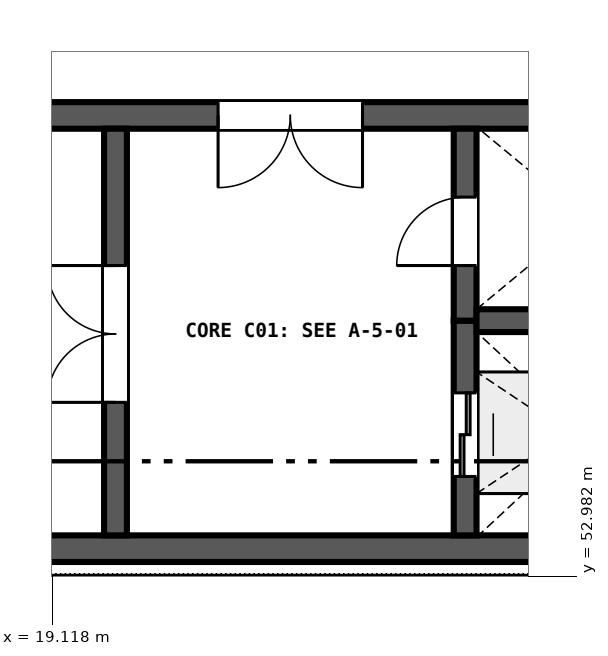
"""IFC4 building model, lengths in metres.
Left out: names, types, materials, properties, quantities, classifications, styles, units other than length and angle.
Written with IfcOpenShell. Run it as: python <this file> out.ifc"""

import sys

from ifc_helpers import new_model, si_unit, direction, frame, frame_2d, origin, place, context, subcontext, project, spatial, rectangle, extrude, element, fill, save


model = new_model("IFC4")
c1 = context("Model", 3, precision=1e-05, world=origin(), true_north=direction((0.0, 1.0)))
c2 = subcontext(c1, "Body", "Model", "MODEL_VIEW")
j1 = project(units=[si_unit("LENGTHUNIT", "METRE"), si_unit("PLANEANGLEUNIT", "RADIAN")], contexts=[c1])
p1 = place(None, origin())
s1 = spatial("IfcSite", under=j1, at=p1, CompositionType="ELEMENT")
p2 = place(p1, origin())
s2 = spatial("IfcBuilding", under=s1, at=p2, CompositionType="ELEMENT")
p3 = place(p2, frame((0.0, 0.0, 9.6)))
s3 = spatial("IfcBuildingStorey", under=s2, at=p3, CompositionType="ELEMENT", Elevation=9.6)
p4 = place(p3, frame((9.9, 53.35, 0.0), z_axis=(0.0, 0.0, 1.0), x_axis=(1.0, 0.0, 0.0)))
e1 = element("IfcWall", 1, at=p4, inside=s3, PredefinedType="SHEAR", context=c2, shape_type="SweptSolid", body=[
    extrude(rectangle(XDim=18.0, YDim=0.35, at=frame_2d((9.0, 0.0))), origin(), (0.0, 0.0, 1.0), 4.5),
])
p5 = place(p3, frame((27.9, 59.05, 0.0), z_axis=(0.0, 0.0, 1.0), x_axis=(-1.0, 0.0, 0.0)))
e2 = element("IfcWall", 2, at=p5, inside=s3, PredefinedType="SHEAR", context=c2, shape_type="SweptSolid", body=[
    extrude(rectangle(XDim=18.0, YDim=0.35, at=frame_2d((9.0, 0.0))), origin(), (0.0, 0.0, 1.0), 4.5),
])
p6 = place(p5, frame((4.7, 0.0, 0.0)))
e3 = element("IfcOpeningElement", 3, at=p6, cuts=e2, PredefinedType="OPENING", context=c2, shape_type="SweptSolid", body=[
    extrude(rectangle(XDim=1.9, YDim=2.25, at=frame_2d((0.95, 1.125))), frame((0.0, 0.185, 0.0), z_axis=(0.0, -1.0, 0.0), x_axis=(1.0, 0.0, 0.0)), (0.0, 0.0, 1.0), 0.37),
])
p7 = place(p3, frame((19.95, 53.525, 0.0), z_axis=(0.0, 0.0, 1.0), x_axis=(0.0, 1.0, 0.0)))
e4 = element("IfcWall", 4, at=p7, inside=s3, PredefinedType="SHEAR", context=c2, shape_type="SweptSolid", body=[
    extrude(rectangle(XDim=5.35, YDim=0.3, at=frame_2d((2.675, 0.0))), origin(), (0.0, 0.0, 1.0), 4.5),
])
p8 = place(p7, frame((1.75, 0.0, 0.0)))
e5 = element("IfcOpeningElement", 5, at=p8, cuts=e4, PredefinedType="OPENING", context=c2, shape_type="SweptSolid", body=[
    extrude(rectangle(XDim=1.8, YDim=2.25, at=frame_2d((0.9, 1.125))), frame((0.0, 0.16, 0.0), z_axis=(0.0, -1.0, 0.0), x_axis=(1.0, 0.0, 0.0)), (0.0, 0.0, 1.0), 0.32),
])
p9 = place(p3, frame((24.55, 53.525, 0.0), z_axis=(0.0, 0.0, 1.0), x_axis=(0.0, 1.0, 0.0)))
e6 = element("IfcWall", 6, at=p9, inside=s3, PredefinedType="SHEAR", context=c2, shape_type="SweptSolid", body=[
    extrude(rectangle(XDim=2.825, YDim=0.3, at=frame_2d((1.413, 0.0))), origin(), (0.0, 0.0, 1.0), 4.5),
])
p10 = place(p9, frame((0.775, 0.0, 0.0)))
e7 = element("IfcOpeningElement", 7, at=p10, cuts=e6, PredefinedType="OPENING", context=c2, shape_type="SweptSolid", body=[
    extrude(rectangle(XDim=1.1, YDim=2.1, at=frame_2d((0.55, 1.05))), frame((0.0, 0.16, 0.0), z_axis=(0.0, -1.0, 0.0), x_axis=(1.0, 0.0, 0.0)), (0.0, 0.0, 1.0), 0.32),
])
p11 = place(p3, frame((24.55, 56.35, 0.0), z_axis=(0.0, 0.0, 1.0), x_axis=(0.0, 1.0, 0.0)))
e8 = element("IfcWall", 8, at=p11, inside=s3, PredefinedType="SHEAR", context=c2, shape_type="SweptSolid", body=[
    extrude(rectangle(XDim=2.525, YDim=0.3, at=frame_2d((1.262, 0.0))), origin(), (0.0, 0.0, 1.0), 4.5),
])
p12 = place(p11, frame((0.725, 0.0, 0.0)))
e9 = element("IfcOpeningElement", 9, at=p12, cuts=e8, PredefinedType="OPENING", context=c2, shape_type="SweptSolid", body=[
    extrude(rectangle(XDim=0.9, YDim=2.1, at=frame_2d((0.45, 1.05))), frame((0.0, 0.16, 0.0), z_axis=(0.0, -1.0, 0.0), x_axis=(1.0, 0.0, 0.0)), (0.0, 0.0, 1.0), 0.32),
])
p13 = place(p3, frame((24.7, 56.35, 0.0), z_axis=(0.0, 0.0, 1.0), x_axis=(1.0, 0.0, 0.0)))
e10 = element("IfcWall", 10, at=p13, inside=s3, PredefinedType="SHEAR", context=c2, shape_type="SweptSolid", body=[
    extrude(rectangle(XDim=2.875, YDim=0.3, at=frame_2d((1.438, 0.0))), origin(), (0.0, 0.0, 1.0), 4.5),
])
p14 = place(p8, origin())
e11 = element("IfcDoor", 11, at=p14, inside=s3, OperationType="DOUBLE_DOOR_SINGLE_SWING", PredefinedType="DOOR", context=c2, shape_type="SweptSolid", body=[
    extrude(rectangle(XDim=1.8, YDim=2.25, at=frame_2d((0.9, 1.125))), frame((0.0, 0.025, 0.0), z_axis=(0.0, -1.0, 0.0), x_axis=(1.0, 0.0, 0.0)), (0.0, 0.0, 1.0), 0.05),
])
fill(e5, e11)
p15 = place(p12, origin())
e12 = element("IfcDoor", 12, at=p15, inside=s3, OperationType="SINGLE_SWING_LEFT", PredefinedType="DOOR", context=c2, shape_type="SweptSolid", body=[
    extrude(rectangle(XDim=0.9, YDim=2.1, at=frame_2d((0.45, 1.05))), frame((0.0, 0.025, 0.0), z_axis=(0.0, -1.0, 0.0), x_axis=(1.0, 0.0, 0.0)), (0.0, 0.0, 1.0), 0.05),
])
fill(e9, e12)
p16 = place(p10, origin())
e13 = element("IfcDoor", 13, at=p16, inside=s3, OperationType="DOUBLE_DOOR_SLIDING", PredefinedType="DOOR", context=c2, shape_type="SweptSolid", body=[
    extrude(rectangle(XDim=1.1, YDim=2.1, at=frame_2d((0.55, 1.05))), frame((0.0, 0.025, 0.0), z_axis=(0.0, -1.0, 0.0), x_axis=(1.0, 0.0, 0.0)), (0.0, 0.0, 1.0), 0.05),
])
fill(e7, e13)
p17 = place(p6, origin())
e14 = element("IfcDoor", 14, at=p17, inside=s3, OperationType="DOUBLE_DOOR_SINGLE_SWING", PredefinedType="DOOR", context=c2, shape_type="SweptSolid", body=[
    extrude(rectangle(XDim=1.9, YDim=2.25, at=frame_2d((0.95, 1.125))), frame((0.0, 0.025, 0.0), z_axis=(0.0, -1.0, 0.0), x_axis=(1.0, 0.0, 0.0)), (0.0, 0.0, 1.0), 0.05),
])
fill(e3, e14)
save(model, sys.argv[1])
